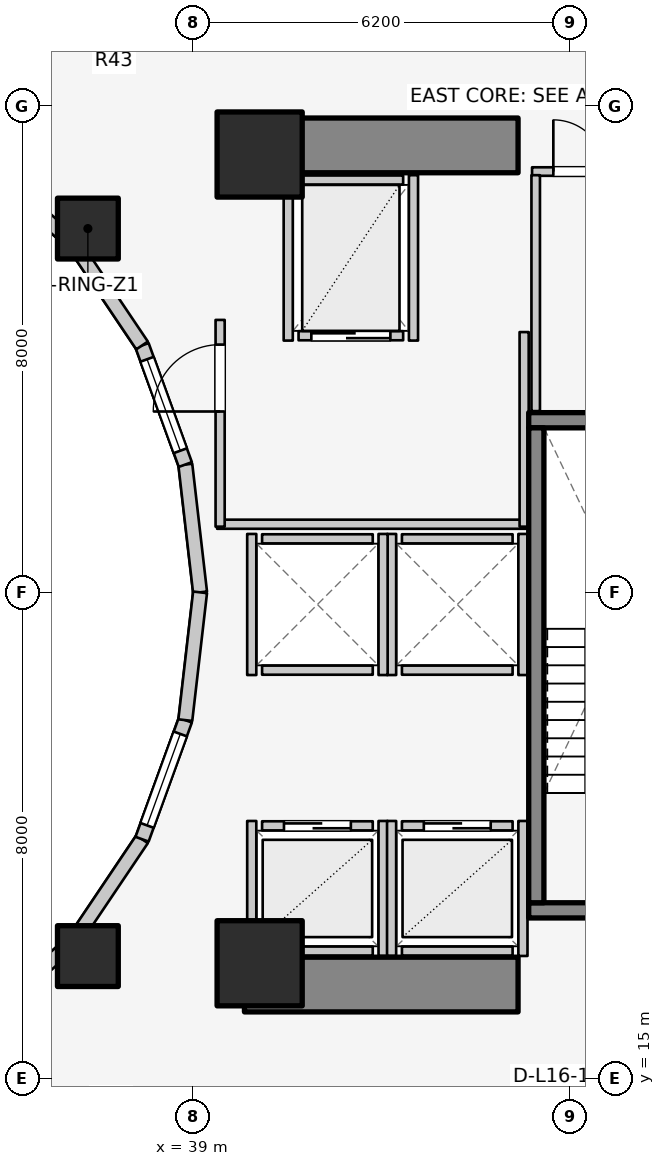
"""IFC4 building model, lengths in metres.
Left out: names, types, materials, properties, quantities, classifications, styles, units other than length and angle.
Written with IfcOpenShell. Run it as: python <this file> out.ifc"""

import sys

from ifc_helpers import new_model, si_unit, direction, frame, frame_2d, origin, origin_2d, place, context, subcontext, project, spatial, rectangle, extrude, element, fill, save


model = new_model("IFC4")
c1 = context("Model", 3, precision=1e-05, world=origin(), true_north=direction((0.0, 1.0)))
c2 = subcontext(c1, "Body", "Model", "MODEL_VIEW")
j1 = project(units=[si_unit("LENGTHUNIT", "METRE"), si_unit("PLANEANGLEUNIT", "RADIAN")], contexts=[c1])
p1 = place(None, origin())
s1 = spatial("IfcSite", under=j1, at=p1, CompositionType="ELEMENT")
p2 = place(p1, origin())
s2 = spatial("IfcBuilding", under=s1, at=p2, CompositionType="ELEMENT")
p3 = place(p2, frame((0.0, 0.0, 55.5)))
s3 = spatial("IfcBuildingStorey", under=s2, at=p3, CompositionType="ELEMENT", Elevation=55.5)
for number, where, z_axis, x_axis in (
    (1, (39.85, 16.55, 0.0), (0.0, 0.0, 1.0), (1.0, 0.0, 0.0)),
    (2, (39.85, 30.35, 0.0), (0.0, 0.0, 1.0), (1.0, 0.0, 0.0)),
):
    element("IfcWall", number, at=place(p3, frame(where, z_axis=z_axis, x_axis=x_axis)), inside=s3, PredefinedType="SHEAR", context=c2, shape_type="SweptSolid", body=[
        extrude(rectangle(XDim=4.5, YDim=0.9, at=frame_2d((2.25, 0.0))), origin(), (0.0, 0.0, 1.0), 3.1),
    ])
p4 = place(p3, frame((44.525, 17.77, 0.0), z_axis=(0.0, 0.0, 1.0), x_axis=(1.0, 0.0, 0.0)))
e3 = element("IfcWall", 3, at=p4, inside=s3, PredefinedType="SOLIDWALL", context=c2, shape_type="SweptSolid", body=[
    extrude(rectangle(XDim=3.37, YDim=0.25, at=frame_2d((1.685, 0.0))), origin(), (0.0, 0.0, 1.0), 3.1),
])
p5 = place(p4, frame((1.135, 0.0, 0.0)))
e4 = element("IfcOpeningElement", 4, at=p5, cuts=e3, PredefinedType="OPENING", context=c2, shape_type="SweptSolid", body=[
    extrude(rectangle(XDim=1.1, YDim=2.1, at=frame_2d((0.55, 1.05))), frame((0.0, 0.135, 0.0), z_axis=(0.0, -1.0, 0.0), x_axis=(1.0, 0.0, 0.0)), (0.0, 0.0, 1.0), 0.27),
])
p6 = place(p3, frame((44.525, 25.83, 0.0), z_axis=(0.0, 0.0, 1.0), x_axis=(1.0, 0.0, 0.0)))
e5 = element("IfcWall", 5, at=p6, inside=s3, PredefinedType="SOLIDWALL", context=c2, shape_type="SweptSolid", body=[
    extrude(rectangle(XDim=3.37, YDim=0.25, at=frame_2d((1.685, 0.0))), origin(), (0.0, 0.0, 1.0), 3.1),
])
p7 = place(p3, frame((44.65, 17.895, 0.0), z_axis=(0.0, 0.0, 1.0), x_axis=(0.0, 1.0, 0.0)))
e6 = element("IfcWall", 6, at=p7, inside=s3, PredefinedType="SOLIDWALL", context=c2, shape_type="SweptSolid", body=[
    extrude(rectangle(XDim=7.81, YDim=0.25, at=frame_2d((3.905, 0.0))), origin(), (0.0, 0.0, 1.0), 3.1),
])
for number, where, z_axis, x_axis in (
    (7, (40.1, 16.9, 0.0), (0.0, 0.0, 1.0), (1.0, 0.0, 0.0)),
    (8, (40.1, 30.2, 0.0), (0.0, 0.0, 1.0), (1.0, 0.0, 0.0)),
):
    element("IfcColumn", number, at=place(p3, frame(where, z_axis=z_axis, x_axis=x_axis)), inside=s3, PredefinedType="COLUMN", context=c2, shape_type="SweptSolid", body=[
        extrude(rectangle(XDim=1.4, YDim=1.4, at=origin_2d()), origin(), (0.0, 0.0, 1.0), 3.1),
    ])
for number, where, z_axis, x_axis in (
    (9, (37.275, 28.982, 0.0), (0.0, 0.0, 1.0), (1.0, 0.0, 0.0)),
    (10, (37.275, 17.018, 0.0), (0.0, 0.0, 1.0), (1.0, 0.0, 0.0)),
):
    element("IfcColumn", number, at=place(p3, frame(where, z_axis=z_axis, x_axis=x_axis)), inside=s3, PredefinedType="COLUMN", context=c2, shape_type="SweptSolid", body=[
        extrude(rectangle(XDim=1.0, YDim=1.0, at=origin_2d()), origin(), (0.0, 0.0, 1.0), 3.1),
    ])
p8 = place(p3, frame((39.12, 23.0, 0.0), z_axis=(0.0, 0.0, 1.0), x_axis=(-0.114711713601, 0.993398823617, 0.0)))
e11 = element("IfcWall", 11, at=p8, inside=s3, PredefinedType="STANDARD", context=c2, shape_type="SweptSolid", body=[
    extrude(rectangle(XDim=2.115, YDim=0.23, at=frame_2d((1.058, 0.0))), origin(), (0.0, 0.0, 1.0), 2.84),
])
p9 = place(p3, frame((38.877, 25.102, 0.0), z_axis=(0.0, 0.0, 1.0), x_axis=(-0.341423187295, 0.93990968033, 0.0)))
e12 = element("IfcWall", 12, at=p9, inside=s3, PredefinedType="STANDARD", context=c2, shape_type="SweptSolid", body=[
    extrude(rectangle(XDim=2.084, YDim=0.23, at=frame_2d((1.042, 0.0))), origin(), (0.0, 0.0, 1.0), 2.84),
])
p10 = place(p9, frame((0.242, 0.0, 0.85)))
e13 = element("IfcOpeningElement", 13, at=p10, cuts=e12, PredefinedType="OPENING", context=c2, shape_type="SweptSolid", body=[
    extrude(rectangle(XDim=1.6, YDim=1.65, at=frame_2d((0.8, 0.825))), frame((0.0, 0.125, 0.0), z_axis=(0.0, -1.0, 0.0), x_axis=(1.0, 0.0, 0.0)), (0.0, 0.0, 1.0), 0.25),
])
p11 = place(p3, frame((38.166, 27.06, 0.0), z_axis=(0.0, 0.0, 1.0), x_axis=(-0.558197800898, 0.829707909492, 0.0)))
e14 = element("IfcWall", 14, at=p11, inside=s3, PredefinedType="STANDARD", context=c2, shape_type="SweptSolid", body=[
    extrude(rectangle(XDim=2.027, YDim=0.23, at=frame_2d((1.013, 0.0))), origin(), (0.0, 0.0, 1.0), 2.16),
])
for number, where, z_axis, x_axis in (
    (15, (37.035, 28.742, 0.0), (0.0, 0.0, 1.0), (-0.753, 0.659, 0.0)),
    (16, (35.56, 15.968, 0.0), (0.0, 0.0, 1.0), (0.753, 0.659, 0.0)),
):
    element("IfcWall", number, at=place(p3, frame(where, z_axis=z_axis, x_axis=x_axis)), inside=s3, PredefinedType="STANDARD", context=c2, shape_type="SweptSolid", body=[
        extrude(rectangle(XDim=1.959, YDim=0.23, at=frame_2d((0.98, 0.0))), origin(), (0.0, 0.0, 1.0), 2.16),
    ])
p12 = place(p3, frame((37.035, 17.258, 0.0), z_axis=(0.0, 0.0, 1.0), x_axis=(0.558197800898, 0.829707909492, 0.0)))
e17 = element("IfcWall", 17, at=p12, inside=s3, PredefinedType="STANDARD", context=c2, shape_type="SweptSolid", body=[
    extrude(rectangle(XDim=2.027, YDim=0.23, at=frame_2d((1.013, 0.0))), origin(), (0.0, 0.0, 1.0), 2.16),
])
p13 = place(p3, frame((38.166, 18.94, 0.0), z_axis=(0.0, 0.0, 1.0), x_axis=(0.341423187295, 0.93990968033, 0.0)))
e18 = element("IfcWall", 18, at=p13, inside=s3, PredefinedType="STANDARD", context=c2, shape_type="SweptSolid", body=[
    extrude(rectangle(XDim=2.084, YDim=0.23, at=frame_2d((1.042, 0.0))), origin(), (0.0, 0.0, 1.0), 2.84),
])
p14 = place(p13, frame((0.242, 0.0, 0.85)))
e19 = element("IfcOpeningElement", 19, at=p14, cuts=e18, PredefinedType="OPENING", context=c2, shape_type="SweptSolid", body=[
    extrude(rectangle(XDim=1.6, YDim=1.65, at=frame_2d((0.8, 0.825))), frame((0.0, 0.125, 0.0), z_axis=(0.0, -1.0, 0.0), x_axis=(1.0, 0.0, 0.0)), (0.0, 0.0, 1.0), 0.25),
])
p15 = place(p3, frame((38.877, 20.898, 0.0), z_axis=(0.0, 0.0, 1.0), x_axis=(0.114711713601, 0.993398823617, 0.0)))
e20 = element("IfcWall", 20, at=p15, inside=s3, PredefinedType="STANDARD", context=c2, shape_type="SweptSolid", body=[
    extrude(rectangle(XDim=2.115, YDim=0.23, at=frame_2d((1.058, 0.0))), origin(), (0.0, 0.0, 1.0), 2.84),
])
p16 = place(p3, frame((40.14, 19.16, 0.0), z_axis=(0.0, 0.0, 1.0), x_axis=(1.0, 0.0, 0.0)))
e21 = element("IfcWall", 21, at=p16, inside=s3, PredefinedType="SOLIDWALL", context=c2, shape_type="SweptSolid", body=[
    extrude(rectangle(XDim=1.82, YDim=0.15, at=frame_2d((0.91, 0.0))), origin(), (0.0, 0.0, 1.0), 2.12),
])
p17 = place(p16, frame((0.36, 0.0, 0.0)))
e22 = element("IfcOpeningElement", 22, at=p17, cuts=e21, PredefinedType="OPENING", context=c2, shape_type="SweptSolid", body=[
    extrude(rectangle(XDim=1.1, YDim=2.1, at=frame_2d((0.55, 1.05))), frame((0.0, 0.085, 0.0), z_axis=(0.0, -1.0, 0.0), x_axis=(1.0, 0.0, 0.0)), (0.0, 0.0, 1.0), 0.17),
])
p18 = place(p3, frame((40.14, 17.1, 0.0), z_axis=(0.0, 0.0, 1.0), x_axis=(1.0, 0.0, 0.0)))
e23 = element("IfcWall", 23, at=p18, inside=s3, PredefinedType="SOLIDWALL", context=c2, shape_type="SweptSolid", body=[
    extrude(rectangle(XDim=1.82, YDim=0.15, at=frame_2d((0.91, 0.0))), origin(), (0.0, 0.0, 1.0), 2.12),
])
p19 = place(p3, frame((39.97, 17.02, 0.0), z_axis=(0.0, 0.0, 1.0), x_axis=(0.0, 1.0, 0.0)))
e24 = element("IfcWall", 24, at=p19, inside=s3, PredefinedType="SOLIDWALL", context=c2, shape_type="SweptSolid", body=[
    extrude(rectangle(XDim=2.22, YDim=0.15, at=frame_2d((1.11, 0.0))), origin(), (0.0, 0.0, 1.0), 2.12),
])
p20 = place(p3, frame((42.13, 17.02, 0.0), z_axis=(0.0, 0.0, 1.0), x_axis=(0.0, 1.0, 0.0)))
e25 = element("IfcWall", 25, at=p20, inside=s3, PredefinedType="SOLIDWALL", context=c2, shape_type="SweptSolid", body=[
    extrude(rectangle(XDim=2.22, YDim=0.15, at=frame_2d((1.11, 0.0))), origin(), (0.0, 0.0, 1.0), 2.855),
])
p21 = place(p3, frame((42.44, 19.16, 0.0), z_axis=(0.0, 0.0, 1.0), x_axis=(1.0, 0.0, 0.0)))
e26 = element("IfcWall", 26, at=p21, inside=s3, PredefinedType="SOLIDWALL", context=c2, shape_type="SweptSolid", body=[
    extrude(rectangle(XDim=1.82, YDim=0.15, at=frame_2d((0.91, 0.0))), origin(), (0.0, 0.0, 1.0), 2.855),
])
p22 = place(p21, frame((0.36, 0.0, 0.0)))
e27 = element("IfcOpeningElement", 27, at=p22, cuts=e26, PredefinedType="OPENING", context=c2, shape_type="SweptSolid", body=[
    extrude(rectangle(XDim=1.1, YDim=2.1, at=frame_2d((0.55, 1.05))), frame((0.0, 0.085, 0.0), z_axis=(0.0, -1.0, 0.0), x_axis=(1.0, 0.0, 0.0)), (0.0, 0.0, 1.0), 0.17),
])
p23 = place(p3, frame((42.44, 17.1, 0.0), z_axis=(0.0, 0.0, 1.0), x_axis=(1.0, 0.0, 0.0)))
e28 = element("IfcWall", 28, at=p23, inside=s3, PredefinedType="SOLIDWALL", context=c2, shape_type="SweptSolid", body=[
    extrude(rectangle(XDim=1.82, YDim=0.15, at=frame_2d((0.91, 0.0))), origin(), (0.0, 0.0, 1.0), 2.855),
])
p24 = place(p3, frame((42.27, 17.02, 0.0), z_axis=(0.0, 0.0, 1.0), x_axis=(0.0, 1.0, 0.0)))
e29 = element("IfcWall", 29, at=p24, inside=s3, PredefinedType="SOLIDWALL", context=c2, shape_type="SweptSolid", body=[
    extrude(rectangle(XDim=2.22, YDim=0.15, at=frame_2d((1.11, 0.0))), origin(), (0.0, 0.0, 1.0), 2.855),
])
p25 = place(p3, frame((44.43, 17.02, 0.0), z_axis=(0.0, 0.0, 1.0), x_axis=(0.0, 1.0, 0.0)))
e30 = element("IfcWall", 30, at=p25, inside=s3, PredefinedType="SOLIDWALL", context=c2, shape_type="SweptSolid", body=[
    extrude(rectangle(XDim=2.22, YDim=0.15, at=frame_2d((1.11, 0.0))), origin(), (0.0, 0.0, 1.0), 2.12),
])
for number, where, z_axis, x_axis in (
    (31, (42.44, 21.72, 0.0), (0.0, 0.0, 1.0), (1.0, 0.0, 0.0)),
    (32, (42.44, 23.88, 0.0), (0.0, 0.0, 1.0), (1.0, 0.0, 0.0)),
):
    element("IfcWall", number, at=place(p3, frame(where, z_axis=z_axis, x_axis=x_axis)), inside=s3, PredefinedType="SOLIDWALL", context=c2, shape_type="SweptSolid", body=[
        extrude(rectangle(XDim=1.82, YDim=0.15, at=frame_2d((0.91, 0.0))), origin(), (0.0, 0.0, 1.0), 2.855),
    ])
for number, where, z_axis, x_axis in (
    (33, (42.27, 21.64, 0.0), (0.0, 0.0, 1.0), (0.0, 1.0, 0.0)),
    (34, (44.43, 21.64, 0.0), (0.0, 0.0, 1.0), (0.0, 1.0, 0.0)),
):
    element("IfcWall", number, at=place(p3, frame(where, z_axis=z_axis, x_axis=x_axis)), inside=s3, PredefinedType="SOLIDWALL", context=c2, shape_type="SweptSolid", body=[
        extrude(rectangle(XDim=2.32, YDim=0.15, at=frame_2d((1.16, 0.0))), origin(), (0.0, 0.0, 1.0), 2.855),
    ])
for number, where, z_axis, x_axis in (
    (35, (40.14, 21.72, 0.0), (0.0, 0.0, 1.0), (1.0, 0.0, 0.0)),
    (36, (40.14, 23.88, 0.0), (0.0, 0.0, 1.0), (1.0, 0.0, 0.0)),
):
    element("IfcWall", number, at=place(p3, frame(where, z_axis=z_axis, x_axis=x_axis)), inside=s3, PredefinedType="SOLIDWALL", context=c2, shape_type="SweptSolid", body=[
        extrude(rectangle(XDim=1.82, YDim=0.15, at=frame_2d((0.91, 0.0))), origin(), (0.0, 0.0, 1.0), 2.12),
    ])
p26 = place(p3, frame((39.97, 21.64, 0.0), z_axis=(0.0, 0.0, 1.0), x_axis=(0.0, 1.0, 0.0)))
e37 = element("IfcWall", 37, at=p26, inside=s3, PredefinedType="SOLIDWALL", context=c2, shape_type="SweptSolid", body=[
    extrude(rectangle(XDim=2.32, YDim=0.15, at=frame_2d((1.16, 0.0))), origin(), (0.0, 0.0, 1.0), 2.12),
])
p27 = place(p3, frame((42.13, 21.64, 0.0), z_axis=(0.0, 0.0, 1.0), x_axis=(0.0, 1.0, 0.0)))
e38 = element("IfcWall", 38, at=p27, inside=s3, PredefinedType="SOLIDWALL", context=c2, shape_type="SweptSolid", body=[
    extrude(rectangle(XDim=2.32, YDim=0.15, at=frame_2d((1.16, 0.0))), origin(), (0.0, 0.0, 1.0), 2.855),
])
p28 = place(p3, frame((40.74, 27.22, 0.0), z_axis=(0.0, 0.0, 1.0), x_axis=(1.0, 0.0, 0.0)))
e39 = element("IfcWall", 39, at=p28, inside=s3, PredefinedType="SOLIDWALL", context=c2, shape_type="SweptSolid", body=[
    extrude(rectangle(XDim=1.72, YDim=0.15, at=frame_2d((0.86, 0.0))), origin(), (0.0, 0.0, 1.0), 2.855),
])
p29 = place(p28, frame((0.21, 0.0, 0.0)))
e40 = element("IfcOpeningElement", 40, at=p29, cuts=e39, PredefinedType="OPENING", context=c2, shape_type="SweptSolid", body=[
    extrude(rectangle(XDim=1.3, YDim=2.1, at=frame_2d((0.65, 1.05))), frame((0.0, 0.085, 0.0), z_axis=(0.0, -1.0, 0.0), x_axis=(1.0, 0.0, 0.0)), (0.0, 0.0, 1.0), 0.17),
])
p30 = place(p3, frame((40.74, 29.78, 0.0), z_axis=(0.0, 0.0, 1.0), x_axis=(1.0, 0.0, 0.0)))
e41 = element("IfcWall", 41, at=p30, inside=s3, PredefinedType="SOLIDWALL", context=c2, shape_type="SweptSolid", body=[
    extrude(rectangle(XDim=1.72, YDim=0.15, at=frame_2d((0.86, 0.0))), origin(), (0.0, 0.0, 1.0), 2.855),
])
for number, where, z_axis, x_axis in (
    (42, (40.57, 27.14, 0.0), (0.0, 0.0, 1.0), (0.0, 1.0, 0.0)),
    (43, (42.63, 27.14, 0.0), (0.0, 0.0, 1.0), (0.0, 1.0, 0.0)),
):
    element("IfcWall", number, at=place(p3, frame(where, z_axis=z_axis, x_axis=x_axis)), inside=s3, PredefinedType="SOLIDWALL", context=c2, shape_type="SweptSolid", body=[
        extrude(rectangle(XDim=2.72, YDim=0.15, at=frame_2d((1.36, 0.0))), origin(), (0.0, 0.0, 1.0), 2.855),
    ])
p31 = place(p3, frame((39.4, 24.12, 0.0), z_axis=(0.0, 0.0, 1.0), x_axis=(1.0, 0.0, 0.0)))
e44 = element("IfcWall", 44, at=p31, inside=s3, PredefinedType="PARTITIONING", context=c2, shape_type="SweptSolid", body=[
    extrude(rectangle(XDim=5.08, YDim=0.15, at=frame_2d((2.54, 0.0))), origin(), (0.0, 0.0, 1.0), 2.12),
])
p32 = place(p3, frame((44.45, 24.08, 0.0), z_axis=(0.0, 0.0, 1.0), x_axis=(0.0, 1.0, 0.0)))
e45 = element("IfcWall", 45, at=p32, inside=s3, PredefinedType="PARTITIONING", context=c2, shape_type="SweptSolid", body=[
    extrude(rectangle(XDim=3.2, YDim=0.15, at=frame_2d((1.6, 0.0))), origin(), (0.0, 0.0, 1.0), 2.855),
])
p33 = place(p3, frame((39.45, 24.08, 0.0), z_axis=(0.0, 0.0, 1.0), x_axis=(0.0, 1.0, 0.0)))
e46 = element("IfcWall", 46, at=p33, inside=s3, PredefinedType="PARTITIONING", context=c2, shape_type="SweptSolid", body=[
    extrude(rectangle(XDim=3.4, YDim=0.15, at=frame_2d((1.7, 0.0))), origin(), (0.0, 0.0, 1.0), 2.855),
])
p34 = place(p33, frame((1.894, 0.0, 0.0)))
e47 = element("IfcOpeningElement", 47, at=p34, cuts=e46, PredefinedType="OPENING", context=c2, shape_type="SweptSolid", body=[
    extrude(rectangle(XDim=1.1, YDim=2.1, at=frame_2d((0.55, 1.05))), frame((0.0, 0.085, 0.0), z_axis=(0.0, -1.0, 0.0), x_axis=(1.0, 0.0, 0.0)), (0.0, 0.0, 1.0), 0.17),
])
p35 = place(p3, frame((44.58, 29.92, 0.0), z_axis=(0.0, 0.0, 1.0), x_axis=(1.0, 0.0, 0.0)))
e48 = element("IfcWall", 48, at=p35, inside=s3, PredefinedType="PLUMBINGWALL", context=c2, shape_type="SweptSolid", body=[
    extrude(rectangle(XDim=1.6, YDim=0.14, at=frame_2d((0.8, 0.0))), origin(), (0.0, 0.0, 1.0), 2.855),
])
p36 = place(p35, frame((0.35, 0.0, 0.0)))
e49 = element("IfcOpeningElement", 49, at=p36, cuts=e48, PredefinedType="OPENING", context=c2, shape_type="SweptSolid", body=[
    extrude(rectangle(XDim=0.85, YDim=2.05, at=frame_2d((0.425, 1.025))), frame((0.0, 0.08, 0.0), z_axis=(0.0, -1.0, 0.0), x_axis=(1.0, 0.0, 0.0)), (0.0, 0.0, 1.0), 0.16),
])
p37 = place(p3, frame((44.64, 25.98, 0.0), z_axis=(0.0, 0.0, 1.0), x_axis=(0.0, 1.0, 0.0)))
e50 = element("IfcWall", 50, at=p37, inside=s3, PredefinedType="PLUMBINGWALL", context=c2, shape_type="SweptSolid", body=[
    extrude(rectangle(XDim=3.88, YDim=0.14, at=frame_2d((1.94, 0.0))), origin(), (0.0, 0.0, 1.0), 2.855),
])
p38 = place(p10, origin())
e51 = element("IfcWindow", 51, at=p38, inside=s3, PartitioningType="SINGLE_PANEL", PredefinedType="WINDOW", context=c2, shape_type="SweptSolid", body=[
    extrude(rectangle(XDim=1.6, YDim=1.65, at=frame_2d((0.8, 0.825))), frame((0.0, 0.03, 0.0), z_axis=(0.0, -1.0, 0.0), x_axis=(1.0, 0.0, 0.0)), (0.0, 0.0, 1.0), 0.06),
])
fill(e13, e51)
p39 = place(p14, origin())
e52 = element("IfcWindow", 52, at=p39, inside=s3, PartitioningType="SINGLE_PANEL", PredefinedType="WINDOW", context=c2, shape_type="SweptSolid", body=[
    extrude(rectangle(XDim=1.6, YDim=1.65, at=frame_2d((0.8, 0.825))), frame((0.0, 0.03, 0.0), z_axis=(0.0, -1.0, 0.0), x_axis=(1.0, 0.0, 0.0)), (0.0, 0.0, 1.0), 0.06),
])
fill(e19, e52)
p40 = place(p17, origin())
e53 = element("IfcDoor", 53, at=p40, inside=s3, OperationType="DOUBLE_DOOR_SLIDING", PredefinedType="DOOR", context=c2, shape_type="SweptSolid", body=[
    extrude(rectangle(XDim=1.1, YDim=2.1, at=frame_2d((0.55, 1.05))), frame((0.0, 0.025, 0.0), z_axis=(0.0, -1.0, 0.0), x_axis=(1.0, 0.0, 0.0)), (0.0, 0.0, 1.0), 0.05),
])
fill(e22, e53)
p41 = place(p22, origin())
e54 = element("IfcDoor", 54, at=p41, inside=s3, OperationType="DOUBLE_DOOR_SLIDING", PredefinedType="DOOR", context=c2, shape_type="SweptSolid", body=[
    extrude(rectangle(XDim=1.1, YDim=2.1, at=frame_2d((0.55, 1.05))), frame((0.0, 0.025, 0.0), z_axis=(0.0, -1.0, 0.0), x_axis=(1.0, 0.0, 0.0)), (0.0, 0.0, 1.0), 0.05),
])
fill(e27, e54)
p42 = place(p29, origin())
e55 = element("IfcDoor", 55, at=p42, inside=s3, OperationType="DOUBLE_DOOR_SLIDING", PredefinedType="DOOR", context=c2, shape_type="SweptSolid", body=[
    extrude(rectangle(XDim=1.3, YDim=2.1, at=frame_2d((0.65, 1.05))), frame((0.0, 0.025, 0.0), z_axis=(0.0, -1.0, 0.0), x_axis=(1.0, 0.0, 0.0)), (0.0, 0.0, 1.0), 0.05),
])
fill(e40, e55)
p43 = place(p34, origin())
e56 = element("IfcDoor", 56, at=p43, inside=s3, OperationType="SINGLE_SWING_LEFT", PredefinedType="DOOR", context=c2, shape_type="SweptSolid", body=[
    extrude(rectangle(XDim=1.1, YDim=2.1, at=frame_2d((0.55, 1.05))), frame((0.0, 0.025, 0.0), z_axis=(0.0, -1.0, 0.0), x_axis=(1.0, 0.0, 0.0)), (0.0, 0.0, 1.0), 0.05),
])
fill(e47, e56)
p44 = place(p36, origin())
e57 = element("IfcDoor", 57, at=p44, inside=s3, OperationType="SINGLE_SWING_LEFT", PredefinedType="DOOR", context=c2, shape_type="SweptSolid", body=[
    extrude(rectangle(XDim=0.85, YDim=2.05, at=frame_2d((0.425, 1.025))), frame((0.0, 0.025, 0.0), z_axis=(0.0, -1.0, 0.0), x_axis=(1.0, 0.0, 0.0)), (0.0, 0.0, 1.0), 0.05),
])
fill(e49, e57)
save(model, sys.argv[1])
